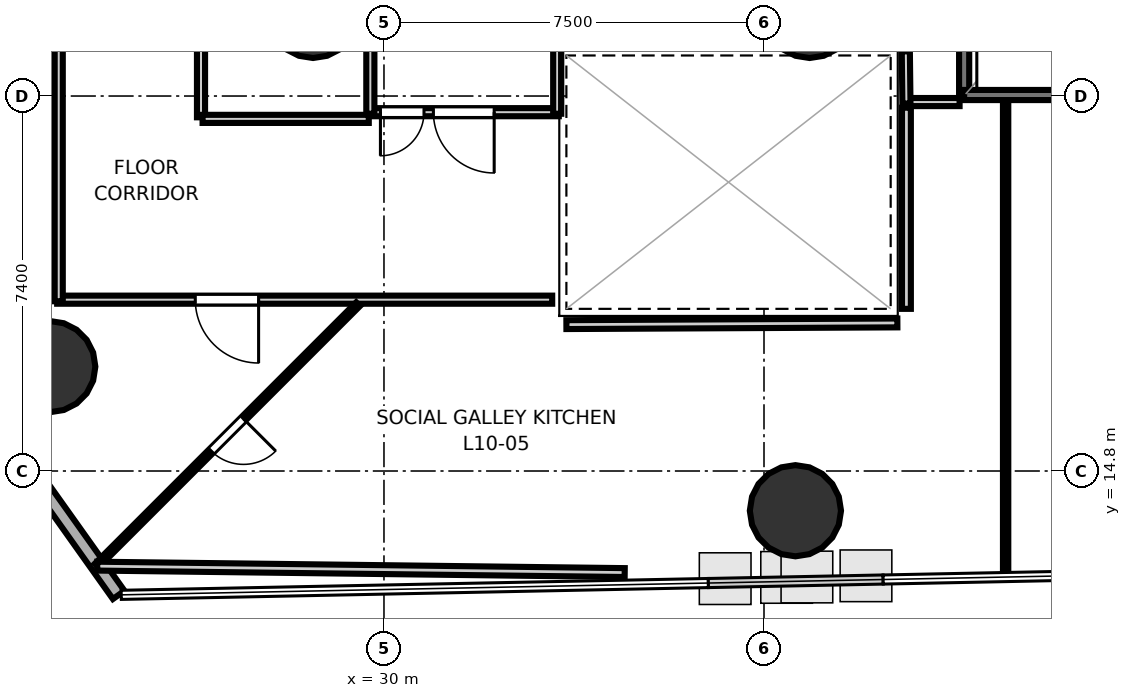
"""IFC4 building model, lengths in metres.
Left out: names, types, materials, properties, quantities, classifications, styles, units other than length and angle.
Written with IfcOpenShell. Run it as: python <this file> out.ifc"""

import sys

from ifc_helpers import new_model, si_unit, direction, frame, frame_2d, origin, origin_2d, place, context, subcontext, project, spatial, rectangle, hollow_circle, extrude, element, fill, save


model = new_model("IFC4")
c1 = context("Model", 3, precision=1e-05, world=origin(), true_north=direction((0.0, 1.0)))
c2 = subcontext(c1, "Body", "Model", "MODEL_VIEW")
j1 = project(units=[si_unit("LENGTHUNIT", "METRE"), si_unit("PLANEANGLEUNIT", "RADIAN")], contexts=[c1])
p1 = place(None, origin())
s1 = spatial("IfcSite", under=j1, at=p1, CompositionType="ELEMENT")
p2 = place(p1, origin())
s2 = spatial("IfcBuilding", under=s1, at=p2, CompositionType="ELEMENT")
p3 = place(p2, frame((0.0, 0.0, 44.2)))
s3 = spatial("IfcBuildingStorey", under=s2, at=p3, CompositionType="ELEMENT", Elevation=44.2)
for number, where, z_axis, x_axis in (
    (1, (28.6, 23.85, 0.0), (0.0, 0.0, 1.0), (1.0, 0.0, 0.0)),
    (2, (38.4, 23.85, 0.0), (0.0, 0.0, 1.0), (1.0, 0.0, 0.0)),
    (3, (23.404, 16.86, 0.0), (0.0, 0.0, 1.0), (1.0, 0.0, 0.0)),
    (4, (38.12, 14.016, 0.0), (0.0, 0.0, 1.0), (1.0, 0.0, 0.0)),
):
    element("IfcColumn", number, at=place(p3, frame(where, z_axis=z_axis, x_axis=x_axis)), inside=s3, PredefinedType="COLUMN", context=c2, shape_type="SweptSolid", body=[
        extrude(hollow_circle(Radius=0.9, WallThickness=0.045, at=origin_2d()), origin(), (0.0, 0.0, 1.0), 3.7),
    ])
p4 = place(p3, frame((17.333, 22.807, 0.0), z_axis=(0.0, 0.0, 1.0), x_axis=(0.579477425236, -0.814988290494, 0.0)))
e5 = element("IfcWall", 5, at=p4, inside=s3, PredefinedType="SOLIDWALL", context=c2, shape_type="SweptSolid", body=[
    extrude(rectangle(XDim=12.824, YDim=0.28, at=frame_2d((6.412, 0.0))), origin(), (0.0, 0.0, 1.0), 3.4),
])
p5 = place(p4, frame((2.947, 0.0, 0.85)))
e6 = element("IfcOpeningElement", 6, at=p5, cuts=e5, PredefinedType="OPENING", context=c2, shape_type="SweptSolid", body=[
    extrude(rectangle(XDim=1.8, YDim=2.1, at=frame_2d((0.9, 1.05))), frame((0.0, 0.15, 0.0), z_axis=(0.0, -1.0, 0.0), x_axis=(1.0, 0.0, 0.0)), (0.0, 0.0, 1.0), 0.3),
])
p6 = place(p4, frame((8.077, 0.0, 0.85)))
e7 = element("IfcOpeningElement", 7, at=p6, cuts=e5, PredefinedType="OPENING", context=c2, shape_type="SweptSolid", body=[
    extrude(rectangle(XDim=1.8, YDim=2.1, at=frame_2d((0.9, 1.05))), frame((0.0, 0.15, 0.0), z_axis=(0.0, -1.0, 0.0), x_axis=(1.0, 0.0, 0.0)), (0.0, 0.0, 1.0), 0.3),
])
p7 = place(p3, frame((41.45, 22.22, 0.0), z_axis=(0.0, 0.0, 1.0), x_axis=(0.0, 1.0, 0.0)))
e8 = element("IfcWall", 8, at=p7, inside=s3, PredefinedType="SOLIDWALL", context=c2, shape_type="SweptSolid", body=[
    extrude(rectangle(XDim=2.36, YDim=0.2, at=frame_2d((1.18, 0.0))), origin(), (0.0, 0.0, 1.0), 3.4),
])
p8 = place(p3, frame((41.45, 22.22, 0.0), z_axis=(0.0, 0.0, 1.0), x_axis=(1.0, 0.0, 0.0)))
e9 = element("IfcWall", 9, at=p8, inside=s3, PredefinedType="SOLIDWALL", context=c2, shape_type="SweptSolid", body=[
    extrude(rectangle(XDim=2.1, YDim=0.2, at=frame_2d((1.05, 0.0))), origin(), (0.0, 0.0, 1.0), 3.4),
])
p9 = place(p3, frame((33.45, 21.881, 0.0), z_axis=(0.0, 0.0, 1.0), x_axis=(-1.0, 0.0, 0.0)))
e10 = element("IfcWall", 10, at=p9, inside=s3, PredefinedType="PARTITIONING", context=c2, shape_type="SweptSolid", body=[
    extrude(rectangle(XDim=3.75, YDim=0.16, at=frame_2d((1.875, 0.0))), origin(), (0.0, 0.0, 1.0), 2.72),
])
p10 = place(p9, frame((1.275, 0.0, 0.0)))
e11 = element("IfcOpeningElement", 11, at=p10, cuts=e10, PredefinedType="OPENING", context=c2, shape_type="SweptSolid", body=[
    extrude(rectangle(XDim=1.2, YDim=2.15, at=frame_2d((0.6, 1.075))), frame((0.0, 0.09, 0.0), z_axis=(0.0, -1.0, 0.0), x_axis=(1.0, 0.0, 0.0)), (0.0, 0.0, 1.0), 0.18),
])
p11 = place(p9, frame((2.66, 0.0, 0.0)))
e12 = element("IfcOpeningElement", 12, at=p11, cuts=e10, PredefinedType="OPENING", context=c2, shape_type="SweptSolid", body=[
    extrude(rectangle(XDim=0.86, YDim=2.05, at=frame_2d((0.43, 1.025))), frame((0.0, 0.09, 0.0), z_axis=(0.0, -1.0, 0.0), x_axis=(1.0, 0.0, 0.0)), (0.0, 0.0, 1.0), 0.18),
])
for number, where, z_axis, x_axis in (
    (13, (29.731, 21.85, 0.0), (0.0, 0.0, 1.0), (0.0, 1.0, 0.0)),
    (14, (33.419, 24.342, 0.0), (0.0, 0.0, 1.0), (0.0, -1.0, 0.0)),
):
    element("IfcWall", number, at=place(p3, frame(where, z_axis=z_axis, x_axis=x_axis)), inside=s3, PredefinedType="PARTITIONING", context=c2, shape_type="SweptSolid", body=[
        extrude(rectangle(XDim=2.492, YDim=0.16, at=frame_2d((1.246, 0.0))), origin(), (0.0, 0.0, 1.0), 2.72),
    ])
p12 = place(p3, frame((41.36, 22.081, 0.0), z_axis=(0.0, 0.0, 1.0), x_axis=(-1.0, 0.0, 0.0)))
e15 = element("IfcWall", 15, at=p12, inside=s3, PredefinedType="PARTITIONING", context=c2, shape_type="SweptSolid", body=[
    extrude(rectangle(XDim=1.08, YDim=0.16, at=frame_2d((0.54, 0.0))), origin(), (0.0, 0.0, 1.0), 2.72),
])
p13 = place(p3, frame((40.311, 22.05, 0.0), z_axis=(0.0, 0.0, 1.0), x_axis=(-0.011836292006, 0.999929948642, 0.0)))
e16 = element("IfcWall", 16, at=p13, inside=s3, PredefinedType="PARTITIONING", context=c2, shape_type="SweptSolid", body=[
    extrude(rectangle(XDim=1.031, YDim=0.16, at=frame_2d((0.516, 0.0))), origin(), (0.0, 0.0, 1.0), 2.72),
])
p14 = place(p3, frame((26.389, 24.531, 0.0), z_axis=(0.0, 0.0, 1.0), x_axis=(0.0, -1.0, 0.0)))
e17 = element("IfcWall", 17, at=p14, inside=s3, PredefinedType="PARTITIONING", context=c2, shape_type="SweptSolid", body=[
    extrude(rectangle(XDim=2.75, YDim=0.16, at=frame_2d((1.375, 0.0))), origin(), (0.0, 0.0, 1.0), 2.72),
])
p15 = place(p3, frame((26.42, 21.749, 0.0), z_axis=(0.0, 0.0, 1.0), x_axis=(1.0, 0.0, 0.0)))
e18 = element("IfcWall", 18, at=p15, inside=s3, PredefinedType="PARTITIONING", context=c2, shape_type="SweptSolid", body=[
    extrude(rectangle(XDim=3.28, YDim=0.16, at=frame_2d((1.64, 0.0))), origin(), (0.0, 0.0, 1.0), 2.72),
])
p16 = place(p3, frame((33.32, 18.181, 0.0), z_axis=(0.0, 0.0, 1.0), x_axis=(-1.0, 0.0, 0.0)))
e19 = element("IfcWall", 19, at=p16, inside=s3, PredefinedType="PARTITIONING", context=c2, shape_type="SweptSolid", body=[
    extrude(rectangle(XDim=9.77, YDim=0.16, at=frame_2d((4.885, 0.0))), origin(), (0.0, 0.0, 1.0), 2.678),
])
p17 = place(p16, frame((5.794, 0.0, 0.0)))
e20 = element("IfcOpeningElement", 20, at=p17, cuts=e19, PredefinedType="OPENING", context=c2, shape_type="SweptSolid", body=[
    extrude(rectangle(XDim=1.25, YDim=2.2, at=frame_2d((0.625, 1.1))), frame((0.0, 0.09, 0.0), z_axis=(0.0, -1.0, 0.0), x_axis=(1.0, 0.0, 0.0)), (0.0, 0.0, 1.0), 0.18),
])
p18 = place(p3, frame((23.581, 18.15, 0.0), z_axis=(0.0, 0.0, 1.0), x_axis=(0.0, 1.0, 0.0)))
e21 = element("IfcWall", 21, at=p18, inside=s3, PredefinedType="PARTITIONING", context=c2, shape_type="SweptSolid", body=[
    extrude(rectangle(XDim=13.81, YDim=0.16, at=frame_2d((6.905, 0.0))), origin(), (0.0, 0.0, 1.0), 2.678),
])
p19 = place(p18, frame((8.919, 0.0, 0.0)))
e22 = element("IfcOpeningElement", 22, at=p19, cuts=e21, PredefinedType="OPENING", context=c2, shape_type="SweptSolid", body=[
    extrude(rectangle(XDim=0.9, YDim=2.1, at=frame_2d((0.45, 1.05))), frame((0.0, 0.09, 0.0), z_axis=(0.0, -1.0, 0.0), x_axis=(1.0, 0.0, 0.0)), (0.0, 0.0, 1.0), 0.18),
])
p20 = place(p3, frame((17.361, 22.736, 0.0), z_axis=(0.0, 0.0, 1.0), x_axis=(0.987689944213, 0.156424339859, 0.0)))
e23 = element("IfcWall", 23, at=p20, inside=s3, PredefinedType="PARTITIONING", context=c2, shape_type="SweptSolid", body=[
    extrude(rectangle(XDim=6.19, YDim=0.105, at=frame_2d((3.095, 0.0))), origin(), (0.0, 0.0, 1.0), 2.678),
])
p21 = place(p3, frame((29.489, 18.092, 0.0), z_axis=(0.0, 0.0, 1.0), x_axis=(-0.707106781187, -0.707106781187, 0.0)))
e24 = element("IfcWall", 24, at=p21, inside=s3, PredefinedType="PARTITIONING", context=c2, shape_type="SweptSolid", body=[
    extrude(rectangle(XDim=7.296, YDim=0.105, at=frame_2d((3.648, 0.0))), origin(), (0.0, 0.0, 1.0), 2.678),
])
p22 = place(p21, frame((3.198, 0.0, 0.0)))
e25 = element("IfcOpeningElement", 25, at=p22, cuts=e24, PredefinedType="OPENING", context=c2, shape_type="SweptSolid", body=[
    extrude(rectangle(XDim=0.9, YDim=2.1, at=frame_2d((0.45, 1.05))), frame((0.0, 0.062, 0.0), z_axis=(0.0, -1.0, 0.0), x_axis=(1.0, 0.0, 0.0)), (0.0, 0.0, 1.0), 0.125),
])
p23 = place(p3, frame((37.896, 44.548, 0.0), z_axis=(0.0, 0.0, 1.0), x_axis=(0.674902776071, -0.737906662697, 0.0)))
e26 = element("IfcWall", 26, at=p23, inside=s3, PredefinedType="PARTITIONING", context=c2, shape_type="SweptSolid", body=[
    extrude(rectangle(XDim=31.144, YDim=0.105, at=frame_2d((15.572, 0.0))), origin(), (0.0, 0.0, 1.0), 2.678),
])
p24 = place(p3, frame((42.269, 12.687, 0.0), z_axis=(0.0, 0.0, 1.0), x_axis=(-2.6047772e-05, 0.999999999661, 0.0)))
e27 = element("IfcWall", 27, at=p24, inside=s3, PredefinedType="PARTITIONING", context=c2, shape_type="SweptSolid", body=[
    extrude(rectangle(XDim=9.373, YDim=0.105, at=frame_2d((4.687, 0.0))), origin(), (0.0, 0.0, 1.0), 2.678),
])
p25 = place(p3, frame((33.6, 17.689, 0.0), z_axis=(0.0, 0.0, 1.0), x_axis=(0.999987080982, 0.005083096356, 0.0)))
e28 = element("IfcWall", 28, at=p25, inside=s3, PredefinedType="PLUMBINGWALL", context=c2, shape_type="SweptSolid", body=[
    extrude(rectangle(XDim=6.532, YDim=0.175, at=frame_2d((3.266, 0.0))), origin(), (0.0, 0.0, 1.0), 2.72),
])
p26 = place(p3, frame((40.311, 18.0, 0.0), z_axis=(0.0, 0.0, 1.0), x_axis=(0.0, 1.0, 0.0)))
e29 = element("IfcWall", 29, at=p26, inside=s3, PredefinedType="PLUMBINGWALL", context=c2, shape_type="SweptSolid", body=[
    extrude(rectangle(XDim=3.97, YDim=0.175, at=frame_2d((1.985, 0.0))), origin(), (0.0, 0.0, 1.0), 2.72),
])
p27 = place(p3, frame((34.751, 12.796, 0.0), z_axis=(0.0, 0.0, 1.0), x_axis=(-0.99992593693, 0.012170482898, 0.0)))
e30 = element("IfcWall", 30, at=p27, inside=s3, PredefinedType="PLUMBINGWALL", context=c2, shape_type="SweptSolid", body=[
    extrude(rectangle(XDim=10.411, YDim=0.175, at=frame_2d((5.206, 0.0))), origin(), (0.0, 0.0, 1.0), 2.72),
])
p28 = place(p10, origin())
e31 = element("IfcDoor", 31, at=p28, inside=s3, OperationType="SINGLE_SWING_LEFT", PredefinedType="DOOR", context=c2, shape_type="SweptSolid", body=[
    extrude(rectangle(XDim=1.2, YDim=2.15, at=frame_2d((0.6, 1.075))), frame((0.0, 0.025, 0.0), z_axis=(0.0, -1.0, 0.0), x_axis=(1.0, 0.0, 0.0)), (0.0, 0.0, 1.0), 0.05),
])
fill(e11, e31)
p29 = place(p11, origin())
e32 = element("IfcDoor", 32, at=p29, inside=s3, OperationType="SINGLE_SWING_RIGHT", PredefinedType="DOOR", context=c2, shape_type="SweptSolid", body=[
    extrude(rectangle(XDim=0.86, YDim=2.05, at=frame_2d((0.43, 1.025))), frame((0.0, 0.025, 0.0), z_axis=(0.0, -1.0, 0.0), x_axis=(1.0, 0.0, 0.0)), (0.0, 0.0, 1.0), 0.05),
])
fill(e12, e32)
p30 = place(p17, origin())
e33 = element("IfcDoor", 33, at=p30, inside=s3, OperationType="SINGLE_SWING_LEFT", PredefinedType="DOOR", context=c2, shape_type="SweptSolid", body=[
    extrude(rectangle(XDim=1.25, YDim=2.2, at=frame_2d((0.625, 1.1))), frame((0.0, 0.025, 0.0), z_axis=(0.0, -1.0, 0.0), x_axis=(1.0, 0.0, 0.0)), (0.0, 0.0, 1.0), 0.05),
])
fill(e20, e33)
p31 = place(p22, origin())
e34 = element("IfcDoor", 34, at=p31, inside=s3, OperationType="SINGLE_SWING_LEFT", PredefinedType="DOOR", context=c2, shape_type="SweptSolid", body=[
    extrude(rectangle(XDim=0.9, YDim=2.1, at=frame_2d((0.45, 1.05))), frame((0.0, 0.025, 0.0), z_axis=(0.0, -1.0, 0.0), x_axis=(1.0, 0.0, 0.0)), (0.0, 0.0, 1.0), 0.05),
])
fill(e25, e34)
save(model, sys.argv[1])
